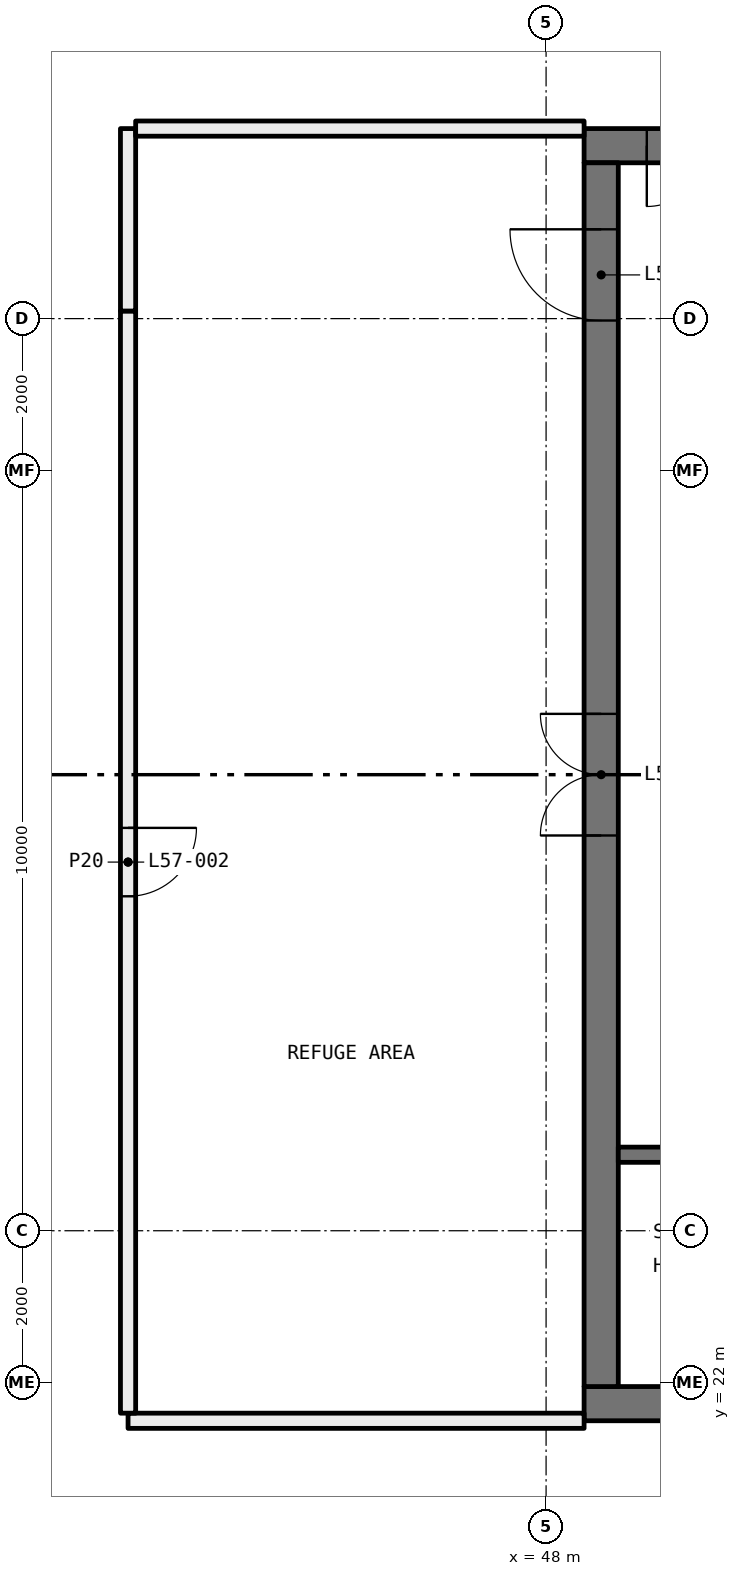
"""IFC4 building model, lengths in metres.
Left out: names, types, materials, properties, quantities, classifications, styles, units other than length and angle.
Written with IfcOpenShell. Run it as: python <this file> out.ifc"""

import sys

from ifc_helpers import new_model, si_unit, direction, frame, frame_2d, origin, place, context, subcontext, project, spatial, rectangle, extrude, element, fill, save


model = new_model("IFC4")
c1 = context("Model", 3, precision=1e-05, world=origin(), true_north=direction((0.0, 1.0)))
c2 = subcontext(c1, "Body", "Model", "MODEL_VIEW")
j1 = project(units=[si_unit("LENGTHUNIT", "METRE"), si_unit("PLANEANGLEUNIT", "RADIAN")], contexts=[c1])
p1 = place(None, origin())
s1 = spatial("IfcSite", under=j1, at=p1, CompositionType="ELEMENT")
p2 = place(p1, origin())
s2 = spatial("IfcBuilding", under=s1, at=p2, CompositionType="ELEMENT")
p3 = place(p2, frame((0.0, 0.0, 213.45)))
s3 = spatial("IfcBuildingStorey", under=s2, at=p3, CompositionType="ELEMENT", Elevation=213.45)
p4 = place(p3, frame((48.5, 21.5, 0.0), z_axis=(0.0, 0.0, 1.0), x_axis=(-1.0, 0.0, 0.0)))
e1 = element("IfcWall", 1, at=p4, inside=s3, PredefinedType="PARTITIONING", context=c2, shape_type="SweptSolid", body=[
    extrude(rectangle(XDim=6.0, YDim=0.2, at=frame_2d((3.0, 0.0))), origin(), (0.0, 0.0, 1.0), 4.1),
])
p5 = place(p3, frame((42.5, 21.6, 0.0), z_axis=(0.0, 0.0, 1.0), x_axis=(0.0, 1.0, 0.0)))
e2 = element("IfcWall", 2, at=p5, inside=s3, PredefinedType="PARTITIONING", context=c2, shape_type="SweptSolid", body=[
    extrude(rectangle(XDim=14.5, YDim=0.2, at=frame_2d((7.25, 0.0))), origin(), (0.0, 0.0, 1.0), 3.5),
])
p6 = place(p5, frame((6.8, 0.0, 0.0)))
e3 = element("IfcOpeningElement", 3, at=p6, cuts=e2, PredefinedType="OPENING", context=c2, shape_type="SweptSolid", body=[
    extrude(rectangle(XDim=0.9, YDim=2.1, at=frame_2d((0.45, 1.05))), frame((0.0, 0.11, 0.0), z_axis=(0.0, -1.0, 0.0), x_axis=(1.0, 0.0, 0.0)), (0.0, 0.0, 1.0), 0.22),
])
p7 = place(p3, frame((42.5, 36.1, 0.0), z_axis=(0.0, 0.0, 1.0), x_axis=(0.0, 1.0, 0.0)))
e4 = element("IfcWall", 4, at=p7, inside=s3, PredefinedType="PARTITIONING", context=c2, shape_type="SweptSolid", body=[
    extrude(rectangle(XDim=2.4, YDim=0.2, at=frame_2d((1.2, 0.0))), origin(), (0.0, 0.0, 1.0), 4.1),
])
p8 = place(p3, frame((42.6, 38.5, 0.0), z_axis=(0.0, 0.0, 1.0), x_axis=(1.0, 0.0, 0.0)))
e5 = element("IfcWall", 5, at=p8, inside=s3, PredefinedType="PARTITIONING", context=c2, shape_type="SweptSolid", body=[
    extrude(rectangle(XDim=5.9, YDim=0.2, at=frame_2d((2.95, 0.0))), origin(), (0.0, 0.0, 1.0), 4.1),
])
p9 = place(p3, frame((59.5, 21.725, 0.0), z_axis=(0.0, 0.0, 1.0), x_axis=(-1.0, 0.0, 0.0)))
e6 = element("IfcWall", 6, at=p9, inside=s3, PredefinedType="SHEAR", context=c2, shape_type="SweptSolid", body=[
    extrude(rectangle(XDim=11.0, YDim=0.45, at=frame_2d((5.5, 0.0))), origin(), (0.0, 0.0, 1.0), 4.1),
])
p10 = place(p9, frame((1.125, 0.0, 0.0)))
e7 = element("IfcOpeningElement", 7, at=p10, cuts=e6, PredefinedType="OPENING", context=c2, shape_type="SweptSolid", body=[
    extrude(rectangle(XDim=1.0, YDim=2.1, at=frame_2d((0.5, 1.05))), frame((0.0, 0.235, 0.0), z_axis=(0.0, -1.0, 0.0), x_axis=(1.0, 0.0, 0.0)), (0.0, 0.0, 1.0), 0.47),
])
p11 = place(p3, frame((59.5, 38.275, 0.0), z_axis=(0.0, 0.0, 1.0), x_axis=(-1.0, 0.0, 0.0)))
e8 = element("IfcWall", 8, at=p11, inside=s3, PredefinedType="SHEAR", context=c2, shape_type="SweptSolid", body=[
    extrude(rectangle(XDim=11.0, YDim=0.45, at=frame_2d((5.5, 0.0))), origin(), (0.0, 0.0, 1.0), 4.1),
])
p12 = place(p11, frame((8.575, 0.0, 0.0)))
e9 = element("IfcOpeningElement", 9, at=p12, cuts=e8, PredefinedType="OPENING", context=c2, shape_type="SweptSolid", body=[
    extrude(rectangle(XDim=1.6, YDim=2.1, at=frame_2d((0.8, 1.05))), frame((0.0, 0.235, 0.0), z_axis=(0.0, -1.0, 0.0), x_axis=(1.0, 0.0, 0.0)), (0.0, 0.0, 1.0), 0.47),
])
p13 = place(p3, frame((48.725, 21.95, 0.0), z_axis=(0.0, 0.0, 1.0), x_axis=(0.0, 1.0, 0.0)))
e10 = element("IfcWall", 10, at=p13, inside=s3, PredefinedType="SHEAR", context=c2, shape_type="SweptSolid", body=[
    extrude(rectangle(XDim=16.1, YDim=0.45, at=frame_2d((8.05, 0.0))), origin(), (0.0, 0.0, 1.0), 4.1),
])
p14 = place(p13, frame((7.25, 0.0, 0.0)))
e11 = element("IfcOpeningElement", 11, at=p14, cuts=e10, PredefinedType="OPENING", context=c2, shape_type="SweptSolid", body=[
    extrude(rectangle(XDim=1.6, YDim=2.1, at=frame_2d((0.8, 1.05))), frame((0.0, 0.235, 0.0), z_axis=(0.0, -1.0, 0.0), x_axis=(1.0, 0.0, 0.0)), (0.0, 0.0, 1.0), 0.47),
])
p15 = place(p13, frame((14.025, 0.0, 0.0)))
e12 = element("IfcOpeningElement", 12, at=p15, cuts=e10, PredefinedType="OPENING", context=c2, shape_type="SweptSolid", body=[
    extrude(rectangle(XDim=1.2, YDim=2.1, at=frame_2d((0.6, 1.05))), frame((0.0, 0.235, 0.0), z_axis=(0.0, -1.0, 0.0), x_axis=(1.0, 0.0, 0.0)), (0.0, 0.0, 1.0), 0.47),
])
p16 = place(p3, frame((56.5, 25.0, 0.0), z_axis=(0.0, 0.0, 1.0), x_axis=(-1.0, 0.0, 0.0)))
e13 = element("IfcWall", 13, at=p16, inside=s3, PredefinedType="SOLIDWALL", context=c2, shape_type="SweptSolid", body=[
    extrude(rectangle(XDim=7.55, YDim=0.2, at=frame_2d((3.775, 0.0))), origin(), (0.0, 0.0, 1.0), 4.1),
])
p17 = place(p6, frame((0.9, 0.0, 0.0), x_axis=(-1.0, 0.0, 0.0)))
e14 = element("IfcDoor", 14, at=p17, inside=s3, OperationType="SINGLE_SWING_RIGHT", PredefinedType="DOOR", context=c2, shape_type="SweptSolid", body=[
    extrude(rectangle(XDim=0.9, YDim=2.1, at=frame_2d((0.45, 1.05))), frame((0.0, 0.025, 0.0), z_axis=(0.0, -1.0, 0.0), x_axis=(1.0, 0.0, 0.0)), (0.0, 0.0, 1.0), 0.05),
])
fill(e3, e14)
p18 = place(p12, origin())
e15 = element("IfcDoor", 15, at=p18, inside=s3, OperationType="DOUBLE_DOOR_SINGLE_SWING", PredefinedType="DOOR", context=c2, shape_type="SweptSolid", body=[
    extrude(rectangle(XDim=1.6, YDim=2.1, at=frame_2d((0.8, 1.05))), frame((0.0, 0.025, 0.0), z_axis=(0.0, -1.0, 0.0), x_axis=(1.0, 0.0, 0.0)), (0.0, 0.0, 1.0), 0.05),
])
fill(e9, e15)
p19 = place(p14, origin())
e16 = element("IfcDoor", 16, at=p19, inside=s3, OperationType="DOUBLE_DOOR_SINGLE_SWING", PredefinedType="DOOR", context=c2, shape_type="SweptSolid", body=[
    extrude(rectangle(XDim=1.6, YDim=2.1, at=frame_2d((0.8, 1.05))), frame((0.0, 0.025, 0.0), z_axis=(0.0, -1.0, 0.0), x_axis=(1.0, 0.0, 0.0)), (0.0, 0.0, 1.0), 0.05),
])
fill(e11, e16)
p20 = place(p15, origin())
e17 = element("IfcDoor", 17, at=p20, inside=s3, OperationType="SINGLE_SWING_LEFT", PredefinedType="DOOR", context=c2, shape_type="SweptSolid", body=[
    extrude(rectangle(XDim=1.2, YDim=2.1, at=frame_2d((0.6, 1.05))), frame((0.0, 0.025, 0.0), z_axis=(0.0, -1.0, 0.0), x_axis=(1.0, 0.0, 0.0)), (0.0, 0.0, 1.0), 0.05),
])
fill(e12, e17)
save(model, sys.argv[1])
